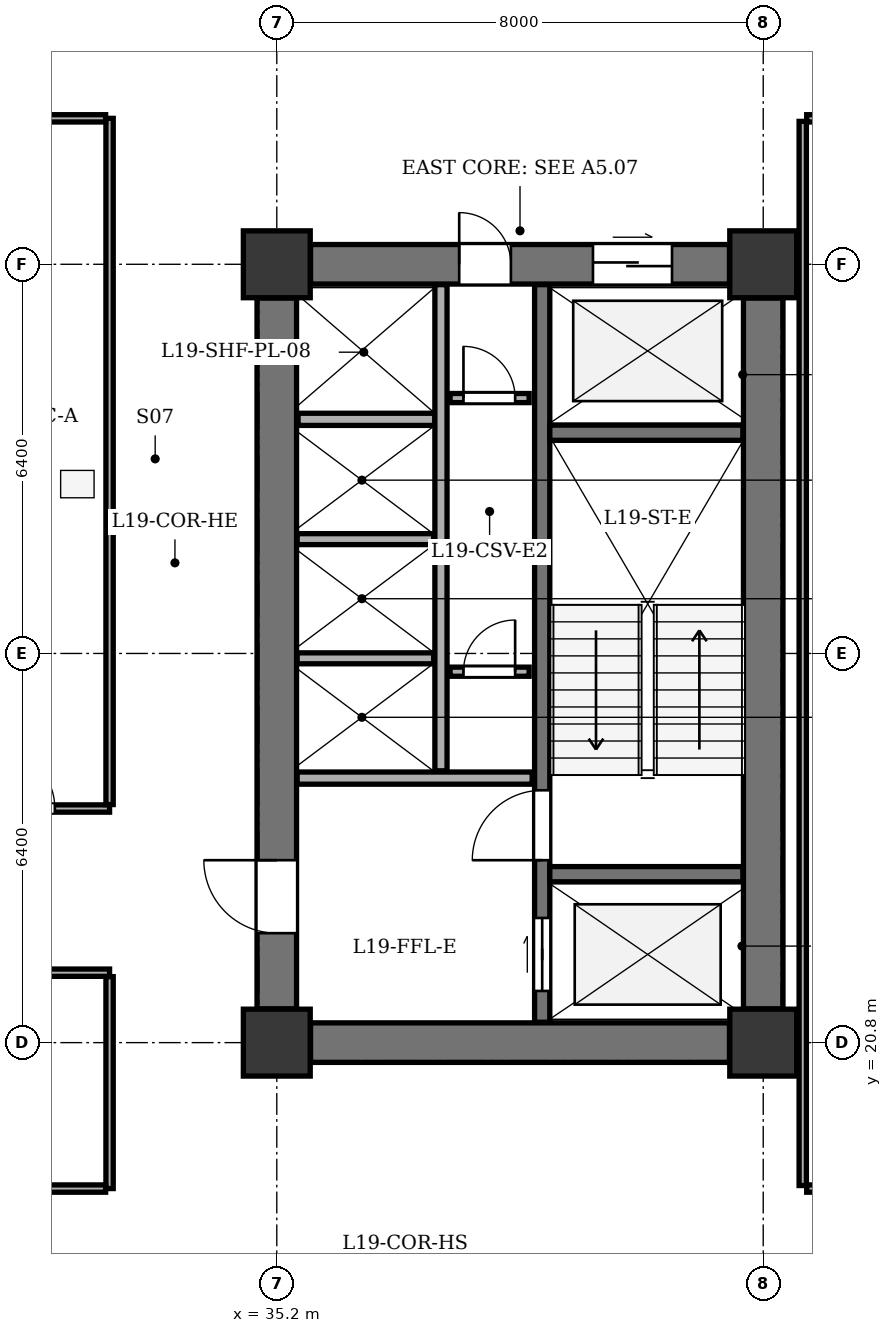
"""IFC4 building model, lengths in metres.
Left out: names, types, materials, properties, quantities, classifications, styles, units other than length and angle.
Written with IfcOpenShell. Run it as: python <this file> out.ifc"""

import sys

from ifc_helpers import new_model, si_unit, direction, frame, frame_2d, origin, origin_2d, place, context, subcontext, project, spatial, rectangle, extrude, element, fill, save


model = new_model("IFC4")
c1 = context("Model", 3, precision=1e-05, world=origin(), true_north=direction((0.0, 1.0)))
c2 = subcontext(c1, "Body", "Model", "MODEL_VIEW")
j1 = project(units=[si_unit("LENGTHUNIT", "METRE"), si_unit("PLANEANGLEUNIT", "RADIAN")], contexts=[c1])
p1 = place(None, origin())
s1 = spatial("IfcSite", under=j1, at=p1, CompositionType="ELEMENT")
p2 = place(p1, origin())
s2 = spatial("IfcBuilding", under=s1, at=p2, CompositionType="ELEMENT")
p3 = place(p2, frame((0.0, 0.0, 78.9)))
s3 = spatial("IfcBuildingStorey", under=s2, at=p3, CompositionType="ELEMENT", Elevation=78.9)
for number, where, z_axis, x_axis in (
    (1, (35.2, 20.8, 0.0), (0.0, 0.0, 1.0), (1.0, 0.0, 0.0)),
    (2, (43.2, 20.8, 0.0), (0.0, 0.0, 1.0), (1.0, 0.0, 0.0)),
    (3, (35.2, 33.6, 0.0), (0.0, 0.0, 1.0), (1.0, 0.0, 0.0)),
    (4, (43.2, 33.6, 0.0), (0.0, 0.0, 1.0), (1.0, 0.0, 0.0)),
):
    element("IfcColumn", number, at=place(p3, frame(where, z_axis=z_axis, x_axis=x_axis)), inside=s3, PredefinedType="COLUMN", context=c2, shape_type="SweptSolid", body=[
        extrude(rectangle(XDim=1.1, YDim=1.1, at=origin_2d()), origin(), (0.0, 0.0, 1.0), 3.9),
    ])
p4 = place(p3, frame((43.2, 21.355, 0.0), z_axis=(0.0, 0.0, 1.0), x_axis=(0.0, 1.0, 0.0)))
e5 = element("IfcWall", 5, at=p4, inside=s3, PredefinedType="SHEAR", context=c2, shape_type="SweptSolid", body=[
    extrude(rectangle(XDim=11.69, YDim=0.65, at=frame_2d((5.845, 0.0))), origin(), (0.0, 0.0, 1.0), 3.6),
])
p5 = place(p3, frame((35.755, 20.8, 0.0), z_axis=(0.0, 0.0, 1.0), x_axis=(1.0, 0.0, 0.0)))
e6 = element("IfcWall", 6, at=p5, inside=s3, PredefinedType="SHEAR", context=c2, shape_type="SweptSolid", body=[
    extrude(rectangle(XDim=6.89, YDim=0.65, at=frame_2d((3.445, 0.0))), origin(), (0.0, 0.0, 1.0), 3.6),
])
p6 = place(p3, frame((35.755, 33.6, 0.0), z_axis=(0.0, 0.0, 1.0), x_axis=(1.0, 0.0, 0.0)))
e7 = element("IfcWall", 7, at=p6, inside=s3, PredefinedType="SHEAR", context=c2, shape_type="SweptSolid", body=[
    extrude(rectangle(XDim=6.89, YDim=0.65, at=frame_2d((3.445, 0.0))), origin(), (0.0, 0.0, 1.0), 3.6),
])
p7 = place(p6, frame((4.645, 0.0, 0.0)))
e8 = element("IfcOpeningElement", 8, at=p7, cuts=e7, PredefinedType="OPENING", context=c2, shape_type="SweptSolid", body=[
    extrude(rectangle(XDim=1.3, YDim=2.15, at=frame_2d((0.65, 1.075))), frame((0.0, 0.335, 0.0), z_axis=(0.0, -1.0, 0.0), x_axis=(1.0, 0.0, 0.0)), (0.0, 0.0, 1.0), 0.67),
])
p8 = place(p6, frame((2.445, 0.0, 0.0)))
e9 = element("IfcOpeningElement", 9, at=p8, cuts=e7, PredefinedType="OPENING", context=c2, shape_type="SweptSolid", body=[
    extrude(rectangle(XDim=0.85, YDim=2.02, at=frame_2d((0.425, 1.01))), frame((0.0, 0.335, 0.0), z_axis=(0.0, -1.0, 0.0), x_axis=(1.0, 0.0, 0.0)), (0.0, 0.0, 1.0), 0.67),
])
p9 = place(p3, frame((35.2, 21.355, 0.0), z_axis=(0.0, 0.0, 1.0), x_axis=(0.0, 1.0, 0.0)))
e10 = element("IfcWall", 10, at=p9, inside=s3, PredefinedType="SHEAR", context=c2, shape_type="SweptSolid", body=[
    extrude(rectangle(XDim=11.69, YDim=0.65, at=frame_2d((5.845, 0.0))), origin(), (0.0, 0.0, 1.0), 3.6),
])
p10 = place(p9, frame((1.245, 0.0, 0.0)))
e11 = element("IfcOpeningElement", 11, at=p10, cuts=e10, PredefinedType="OPENING", context=c2, shape_type="SweptSolid", body=[
    extrude(rectangle(XDim=1.2, YDim=2.15, at=frame_2d((0.6, 1.075))), frame((0.0, 0.335, 0.0), z_axis=(0.0, -1.0, 0.0), x_axis=(1.0, 0.0, 0.0)), (0.0, 0.0, 1.0), 0.67),
])
p11 = place(p3, frame((39.565, 21.135, 0.0), z_axis=(0.0, 0.0, 1.0), x_axis=(0.0, 1.0, 0.0)))
e12 = element("IfcWall", 12, at=p11, inside=s3, PredefinedType="SHEAR", context=c2, shape_type="SweptSolid", body=[
    extrude(rectangle(XDim=12.13, YDim=0.25, at=frame_2d((6.065, 0.0))), origin(), (0.0, 0.0, 1.0), 3.6),
])
p12 = place(p11, frame((0.515, 0.0, 0.0)))
e13 = element("IfcOpeningElement", 13, at=p12, cuts=e12, PredefinedType="OPENING", context=c2, shape_type="SweptSolid", body=[
    extrude(rectangle(XDim=1.2, YDim=2.15, at=frame_2d((0.6, 1.075))), frame((0.0, 0.135, 0.0), z_axis=(0.0, -1.0, 0.0), x_axis=(1.0, 0.0, 0.0)), (0.0, 0.0, 1.0), 0.27),
])
p13 = place(p11, frame((2.665, 0.0, 0.0)))
e14 = element("IfcOpeningElement", 14, at=p13, cuts=e12, PredefinedType="OPENING", context=c2, shape_type="SweptSolid", body=[
    extrude(rectangle(XDim=1.15, YDim=2.15, at=frame_2d((0.575, 1.075))), frame((0.0, 0.135, 0.0), z_axis=(0.0, -1.0, 0.0), x_axis=(1.0, 0.0, 0.0)), (0.0, 0.0, 1.0), 0.27),
])
for number, where, z_axis, x_axis in (
    (15, (39.69, 23.57, 0.0), (0.0, 0.0, 1.0), (1.0, 0.0, 0.0)),
    (16, (39.69, 30.83, 0.0), (0.0, 0.0, 1.0), (1.0, 0.0, 0.0)),
):
    element("IfcWall", number, at=place(p3, frame(where, z_axis=z_axis, x_axis=x_axis)), inside=s3, PredefinedType="SHEAR", context=c2, shape_type="SweptSolid", body=[
        extrude(rectangle(XDim=3.175, YDim=0.25, at=frame_2d((1.587, 0.0))), origin(), (0.0, 0.0, 1.0), 3.6),
    ])
p14 = place(p3, frame((35.535, 25.15, 0.0), z_axis=(0.0, 0.0, 1.0), x_axis=(1.0, 0.0, 0.0)))
e17 = element("IfcWall", 17, at=p14, inside=s3, PredefinedType="SOLIDWALL", context=c2, shape_type="SweptSolid", body=[
    extrude(rectangle(XDim=3.865, YDim=0.2, at=frame_2d((1.933, 0.0))), origin(), (0.0, 0.0, 1.0), 3.6),
])
p15 = place(p3, frame((35.55, 31.05, 0.0), z_axis=(0.0, 0.0, 1.0), x_axis=(1.0, 0.0, 0.0)))
e18 = element("IfcWall", 18, at=p15, inside=s3, PredefinedType="SOLIDWALL", context=c2, shape_type="SweptSolid", body=[
    extrude(rectangle(XDim=2.25, YDim=0.2, at=frame_2d((1.125, 0.0))), origin(), (0.0, 0.0, 1.0), 3.6),
])
p16 = place(p3, frame((37.9, 25.27, 0.0), z_axis=(0.0, 0.0, 1.0), x_axis=(0.0, 1.0, 0.0)))
e19 = element("IfcWall", 19, at=p16, inside=s3, PredefinedType="SOLIDWALL", context=c2, shape_type="SweptSolid", body=[
    extrude(rectangle(XDim=7.995, YDim=0.2, at=frame_2d((3.998, 0.0))), origin(), (0.0, 0.0, 1.0), 3.6),
])
for number, where, z_axis, x_axis in (
    (20, (35.535, 27.12, 0.0), (0.0, 0.0, 1.0), (1.0, 0.0, 0.0)),
    (21, (35.535, 29.08, 0.0), (0.0, 0.0, 1.0), (1.0, 0.0, 0.0)),
):
    element("IfcWall", number, at=place(p3, frame(where, z_axis=z_axis, x_axis=x_axis)), inside=s3, PredefinedType="PARTITIONING", context=c2, shape_type="SweptSolid", body=[
        extrude(rectangle(XDim=2.245, YDim=0.18, at=frame_2d((1.123, 0.0))), origin(), (0.0, 0.0, 1.0), 3.6),
    ])
p17 = place(p3, frame((38.05, 26.9, 0.0), z_axis=(0.0, 0.0, 1.0), x_axis=(1.0, 0.0, 0.0)))
e22 = element("IfcWall", 22, at=p17, inside=s3, PredefinedType="PARTITIONING", context=c2, shape_type="SweptSolid", body=[
    extrude(rectangle(XDim=1.3, YDim=0.15, at=frame_2d((0.65, 0.0))), origin(), (0.0, 0.0, 1.0), 3.6),
])
p18 = place(p17, frame((0.22, 0.0, 0.0)))
e23 = element("IfcOpeningElement", 23, at=p18, cuts=e22, PredefinedType="OPENING", context=c2, shape_type="SweptSolid", body=[
    extrude(rectangle(XDim=0.85, YDim=2.02, at=frame_2d((0.425, 1.01))), frame((0.0, 0.085, 0.0), z_axis=(0.0, -1.0, 0.0), x_axis=(1.0, 0.0, 0.0)), (0.0, 0.0, 1.0), 0.17),
])
p19 = place(p3, frame((38.05, 31.4, 0.0), z_axis=(0.0, 0.0, 1.0), x_axis=(1.0, 0.0, 0.0)))
e24 = element("IfcWall", 24, at=p19, inside=s3, PredefinedType="PARTITIONING", context=c2, shape_type="SweptSolid", body=[
    extrude(rectangle(XDim=1.3, YDim=0.15, at=frame_2d((0.65, 0.0))), origin(), (0.0, 0.0, 1.0), 3.6),
])
p20 = place(p19, frame((0.22, 0.0, 0.0)))
e25 = element("IfcOpeningElement", 25, at=p20, cuts=e24, PredefinedType="OPENING", context=c2, shape_type="SweptSolid", body=[
    extrude(rectangle(XDim=0.85, YDim=2.02, at=frame_2d((0.425, 1.01))), frame((0.0, 0.085, 0.0), z_axis=(0.0, -1.0, 0.0), x_axis=(1.0, 0.0, 0.0)), (0.0, 0.0, 1.0), 0.17),
])
p21 = place(p3, frame((23.55, 24.65, 0.0), z_axis=(0.0, 0.0, 1.0), x_axis=(1.0, 0.0, 0.0)))
e26 = element("IfcWall", 26, at=p21, inside=s3, PredefinedType="PARTITIONING", context=c2, shape_type="SweptSolid", body=[
    extrude(rectangle(XDim=8.9, YDim=0.12, at=frame_2d((4.45, 0.0))), origin(), (0.0, 0.0, 1.0), 3.135),
])
p22 = place(p21, frame((1.0, 0.0, 0.0)))
e27 = element("IfcOpeningElement", 27, at=p22, cuts=e26, PredefinedType="OPENING", context=c2, shape_type="SweptSolid", body=[
    extrude(rectangle(XDim=0.95, YDim=2.1, at=frame_2d((0.475, 1.05))), frame((0.0, 0.07, 0.0), z_axis=(0.0, -1.0, 0.0), x_axis=(1.0, 0.0, 0.0)), (0.0, 0.0, 1.0), 0.14),
])
p23 = place(p21, frame((4.1, 0.0, 0.0)))
e28 = element("IfcOpeningElement", 28, at=p23, cuts=e26, PredefinedType="OPENING", context=c2, shape_type="SweptSolid", body=[
    extrude(rectangle(XDim=0.95, YDim=2.1, at=frame_2d((0.475, 1.05))), frame((0.0, 0.07, 0.0), z_axis=(0.0, -1.0, 0.0), x_axis=(1.0, 0.0, 0.0)), (0.0, 0.0, 1.0), 0.14),
])
p24 = place(p21, frame((7.0, 0.0, 0.0)))
e29 = element("IfcOpeningElement", 29, at=p24, cuts=e26, PredefinedType="OPENING", context=c2, shape_type="SweptSolid", body=[
    extrude(rectangle(XDim=1.0, YDim=2.1, at=frame_2d((0.5, 1.05))), frame((0.0, 0.07, 0.0), z_axis=(0.0, -1.0, 0.0), x_axis=(1.0, 0.0, 0.0)), (0.0, 0.0, 1.0), 0.14),
])
p25 = place(p3, frame((32.45, 24.715, 0.0), z_axis=(0.0, 0.0, 1.0), x_axis=(0.0, 1.0, 0.0)))
e30 = element("IfcWall", 30, at=p25, inside=s3, PredefinedType="PARTITIONING", context=c2, shape_type="SweptSolid", body=[
    extrude(rectangle(XDim=11.285, YDim=0.12, at=frame_2d((5.643, 0.0))), origin(), (0.0, 0.0, 1.0), 3.6),
])
p26 = place(p3, frame((23.615, 36.0, 0.0), z_axis=(0.0, 0.0, 1.0), x_axis=(1.0, 0.0, 0.0)))
e31 = element("IfcWall", 31, at=p26, inside=s3, PredefinedType="PARTITIONING", context=c2, shape_type="SweptSolid", body=[
    extrude(rectangle(XDim=8.77, YDim=0.12, at=frame_2d((4.385, 0.0))), origin(), (0.0, 0.0, 1.0), 3.6),
])
p27 = place(p3, frame((23.55, 21.95, 0.0), z_axis=(0.0, 0.0, 1.0), x_axis=(1.0, 0.0, 0.0)))
e32 = element("IfcWall", 32, at=p27, inside=s3, PredefinedType="PARTITIONING", context=c2, shape_type="SweptSolid", body=[
    extrude(rectangle(XDim=8.9, YDim=0.12, at=frame_2d((4.45, 0.0))), origin(), (0.0, 0.0, 1.0), 3.135),
])
p28 = place(p27, frame((3.6, 0.0, 0.0)))
e33 = element("IfcOpeningElement", 33, at=p28, cuts=e32, PredefinedType="OPENING", context=c2, shape_type="SweptSolid", body=[
    extrude(rectangle(XDim=1.1, YDim=2.15, at=frame_2d((0.55, 1.075))), frame((0.0, 0.07, 0.0), z_axis=(0.0, -1.0, 0.0), x_axis=(1.0, 0.0, 0.0)), (0.0, 0.0, 1.0), 0.14),
])
p29 = place(p3, frame((32.45, 18.4, 0.0), z_axis=(0.0, 0.0, 1.0), x_axis=(0.0, 1.0, 0.0)))
e34 = element("IfcWall", 34, at=p29, inside=s3, PredefinedType="PARTITIONING", context=c2, shape_type="SweptSolid", body=[
    extrude(rectangle(XDim=3.485, YDim=0.12, at=frame_2d((1.743, 0.0))), origin(), (0.0, 0.0, 1.0), 3.6),
])
p30 = place(p3, frame((23.615, 18.4, 0.0), z_axis=(0.0, 0.0, 1.0), x_axis=(1.0, 0.0, 0.0)))
e35 = element("IfcWall", 35, at=p30, inside=s3, PredefinedType="PARTITIONING", context=c2, shape_type="SweptSolid", body=[
    extrude(rectangle(XDim=8.77, YDim=0.12, at=frame_2d((4.385, 0.0))), origin(), (0.0, 0.0, 1.0), 3.6),
])
p31 = place(p3, frame((43.85, 18.45, 0.0), z_axis=(0.0, 0.0, 1.0), x_axis=(0.0, 1.0, 0.0)))
e36 = element("IfcWall", 36, at=p31, inside=s3, PredefinedType="PARTITIONING", context=c2, shape_type="SweptSolid", body=[
    extrude(rectangle(XDim=17.5, YDim=0.12, at=frame_2d((8.75, 0.0))), origin(), (0.0, 0.0, 1.0), 3.6),
])
p32 = place(p3, frame((43.915, 18.4, 0.0), z_axis=(0.0, 0.0, 1.0), x_axis=(1.0, 0.0, 0.0)))
e37 = element("IfcWall", 37, at=p32, inside=s3, PredefinedType="PARTITIONING", context=c2, shape_type="SweptSolid", body=[
    extrude(rectangle(XDim=11.38, YDim=0.12, at=frame_2d((5.69, 0.0))), origin(), (0.0, 0.0, 1.0), 3.6),
])
p33 = place(p32, frame((1.485, 0.0, 0.0)))
e38 = element("IfcOpeningElement", 38, at=p33, cuts=e37, PredefinedType="OPENING", context=c2, shape_type="SweptSolid", body=[
    extrude(rectangle(XDim=0.95, YDim=2.1, at=frame_2d((0.475, 1.05))), frame((0.0, 0.07, 0.0), z_axis=(0.0, -1.0, 0.0), x_axis=(1.0, 0.0, 0.0)), (0.0, 0.0, 1.0), 0.14),
])
p34 = place(p3, frame((43.915, 36.0, 0.0), z_axis=(0.0, 0.0, 1.0), x_axis=(1.0, 0.0, 0.0)))
e39 = element("IfcWall", 39, at=p34, inside=s3, PredefinedType="PARTITIONING", context=c2, shape_type="SweptSolid", body=[
    extrude(rectangle(XDim=11.38, YDim=0.12, at=frame_2d((5.69, 0.0))), origin(), (0.0, 0.0, 1.0), 3.6),
])
p35 = place(p34, frame((1.485, 0.0, 0.0)))
e40 = element("IfcOpeningElement", 40, at=p35, cuts=e39, PredefinedType="OPENING", context=c2, shape_type="SweptSolid", body=[
    extrude(rectangle(XDim=0.95, YDim=2.1, at=frame_2d((0.475, 1.05))), frame((0.0, 0.07, 0.0), z_axis=(0.0, -1.0, 0.0), x_axis=(1.0, 0.0, 0.0)), (0.0, 0.0, 1.0), 0.14),
])
p36 = place(p7, origin())
e41 = element("IfcDoor", 41, at=p36, inside=s3, OperationType="DOUBLE_DOOR_SLIDING", PredefinedType="DOOR", context=c2, shape_type="SweptSolid", body=[
    extrude(rectangle(XDim=1.3, YDim=2.15, at=frame_2d((0.65, 1.075))), frame((0.0, 0.025, 0.0), z_axis=(0.0, -1.0, 0.0), x_axis=(1.0, 0.0, 0.0)), (0.0, 0.0, 1.0), 0.05),
])
fill(e8, e41)
p37 = place(p8, origin())
e42 = element("IfcDoor", 42, at=p37, inside=s3, OperationType="SINGLE_SWING_LEFT", PredefinedType="DOOR", context=c2, shape_type="SweptSolid", body=[
    extrude(rectangle(XDim=0.85, YDim=2.02, at=frame_2d((0.425, 1.01))), frame((0.0, 0.025, 0.0), z_axis=(0.0, -1.0, 0.0), x_axis=(1.0, 0.0, 0.0)), (0.0, 0.0, 1.0), 0.05),
])
fill(e9, e42)
p38 = place(p10, origin())
e43 = element("IfcDoor", 43, at=p38, inside=s3, OperationType="SINGLE_SWING_RIGHT", PredefinedType="DOOR", context=c2, shape_type="SweptSolid", body=[
    extrude(rectangle(XDim=1.2, YDim=2.15, at=frame_2d((0.6, 1.075))), frame((0.0, 0.025, 0.0), z_axis=(0.0, -1.0, 0.0), x_axis=(1.0, 0.0, 0.0)), (0.0, 0.0, 1.0), 0.05),
])
fill(e11, e43)
p39 = place(p12, origin())
e44 = element("IfcDoor", 44, at=p39, inside=s3, OperationType="DOUBLE_DOOR_SLIDING", PredefinedType="DOOR", context=c2, shape_type="SweptSolid", body=[
    extrude(rectangle(XDim=1.2, YDim=2.15, at=frame_2d((0.6, 1.075))), frame((0.0, 0.025, 0.0), z_axis=(0.0, -1.0, 0.0), x_axis=(1.0, 0.0, 0.0)), (0.0, 0.0, 1.0), 0.05),
])
fill(e13, e44)
p40 = place(p13, origin())
e45 = element("IfcDoor", 45, at=p40, inside=s3, OperationType="SINGLE_SWING_LEFT", PredefinedType="DOOR", context=c2, shape_type="SweptSolid", body=[
    extrude(rectangle(XDim=1.15, YDim=2.15, at=frame_2d((0.575, 1.075))), frame((0.0, 0.025, 0.0), z_axis=(0.0, -1.0, 0.0), x_axis=(1.0, 0.0, 0.0)), (0.0, 0.0, 1.0), 0.05),
])
fill(e14, e45)
p41 = place(p18, origin())
e46 = element("IfcDoor", 46, at=p41, inside=s3, OperationType="SINGLE_SWING_RIGHT", PredefinedType="DOOR", context=c2, shape_type="SweptSolid", body=[
    extrude(rectangle(XDim=0.85, YDim=2.02, at=frame_2d((0.425, 1.01))), frame((0.0, 0.025, 0.0), z_axis=(0.0, -1.0, 0.0), x_axis=(1.0, 0.0, 0.0)), (0.0, 0.0, 1.0), 0.05),
])
fill(e23, e46)
p42 = place(p20, origin())
e47 = element("IfcDoor", 47, at=p42, inside=s3, OperationType="SINGLE_SWING_LEFT", PredefinedType="DOOR", context=c2, shape_type="SweptSolid", body=[
    extrude(rectangle(XDim=0.85, YDim=2.02, at=frame_2d((0.425, 1.01))), frame((0.0, 0.025, 0.0), z_axis=(0.0, -1.0, 0.0), x_axis=(1.0, 0.0, 0.0)), (0.0, 0.0, 1.0), 0.05),
])
fill(e25, e47)
p43 = place(p24, origin())
e48 = element("IfcDoor", 48, at=p43, inside=s3, OperationType="SINGLE_SWING_LEFT", PredefinedType="DOOR", context=c2, shape_type="SweptSolid", body=[
    extrude(rectangle(XDim=1.0, YDim=2.1, at=frame_2d((0.5, 1.05))), frame((0.0, 0.025, 0.0), z_axis=(0.0, -1.0, 0.0), x_axis=(1.0, 0.0, 0.0)), (0.0, 0.0, 1.0), 0.05),
])
fill(e29, e48)
save(model, sys.argv[1])
